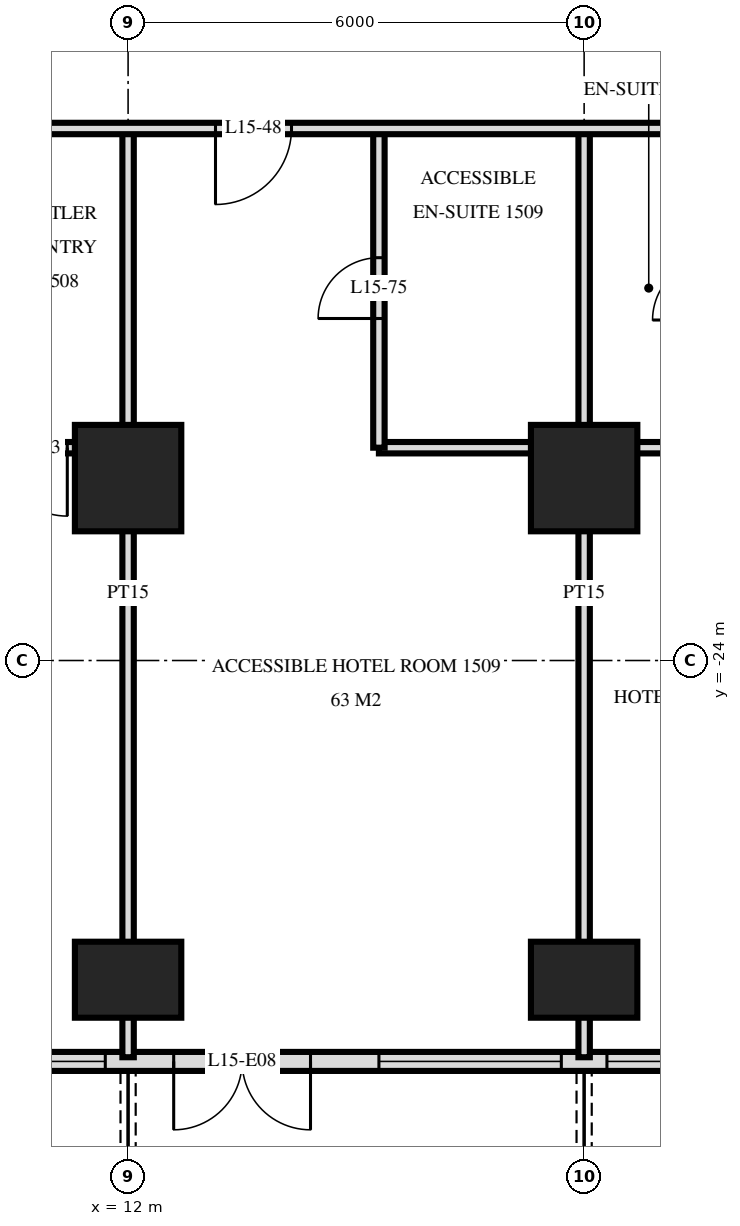
"""IFC4 building model, lengths in metres.
Left out: names, types, materials, properties, quantities, classifications, styles, units other than length and angle.
Written with IfcOpenShell. Run it as: python <this file> out.ifc"""

import sys

from ifc_helpers import new_model, si_unit, direction, frame, frame_2d, origin, origin_2d, place, context, subcontext, project, spatial, rectangle, extrude, element, fill, save


model = new_model("IFC4")
c1 = context("Model", 3, precision=1e-05, world=origin(), true_north=direction((0.0, 1.0)))
c2 = subcontext(c1, "Body", "Model", "MODEL_VIEW")
j1 = project(units=[si_unit("LENGTHUNIT", "METRE"), si_unit("PLANEANGLEUNIT", "RADIAN")], contexts=[c1])
p1 = place(None, origin())
s1 = spatial("IfcSite", under=j1, at=p1, CompositionType="ELEMENT")
p2 = place(p1, origin())
s2 = spatial("IfcBuilding", under=s1, at=p2, CompositionType="ELEMENT")
p3 = place(p2, frame((0.0, 0.0, 63.6)))
s3 = spatial("IfcBuildingStorey", under=s2, at=p3, CompositionType="ELEMENT", Elevation=63.6)
p4 = place(p3, frame((12.0, -28.2, 0.0), z_axis=(0.0, 0.0, 1.0), x_axis=(1.0, 0.0, 0.0)))
e1 = element("IfcColumn", 1, at=p4, inside=s3, PredefinedType="COLUMN", context=c2, shape_type="SweptSolid", body=[
    extrude(rectangle(XDim=1.4, YDim=1.0, at=origin_2d()), origin(), (0.0, 0.0, 1.0), 3.6),
])
p5 = place(p3, frame((12.0, -21.6, 0.0), z_axis=(0.0, 0.0, 1.0), x_axis=(1.0, 0.0, 0.0)))
e2 = element("IfcColumn", 2, at=p5, inside=s3, PredefinedType="COLUMN", context=c2, shape_type="SweptSolid", body=[
    extrude(rectangle(XDim=1.4, YDim=1.4, at=origin_2d()), origin(), (0.0, 0.0, 1.0), 3.6),
])
p6 = place(p3, frame((18.0, -28.2, 0.0), z_axis=(0.0, 0.0, 1.0), x_axis=(1.0, 0.0, 0.0)))
e3 = element("IfcColumn", 3, at=p6, inside=s3, PredefinedType="COLUMN", context=c2, shape_type="SweptSolid", body=[
    extrude(rectangle(XDim=1.4, YDim=1.0, at=origin_2d()), origin(), (0.0, 0.0, 1.0), 3.6),
])
p7 = place(p3, frame((18.0, -21.6, 0.0), z_axis=(0.0, 0.0, 1.0), x_axis=(1.0, 0.0, 0.0)))
e4 = element("IfcColumn", 4, at=p7, inside=s3, PredefinedType="COLUMN", context=c2, shape_type="SweptSolid", body=[
    extrude(rectangle(XDim=1.4, YDim=1.4, at=origin_2d()), origin(), (0.0, 0.0, 1.0), 3.6),
])
p8 = place(p3, frame((-28.775, -29.275, 0.0), z_axis=(0.0, 0.0, 1.0), x_axis=(1.0, 0.0, 0.0)))
e5 = element("IfcWall", 5, at=p8, inside=s3, PredefinedType="SOLIDWALL", context=c2, shape_type="SweptSolid", body=[
    extrude(rectangle(XDim=57.551, YDim=0.25, at=frame_2d((28.775, 0.0))), origin(), (0.0, 0.0, 1.0), 3.32),
])
p9 = place(p8, frame((0.575, 0.0, 0.0)))
e6 = element("IfcOpeningElement", 6, at=p9, cuts=e5, PredefinedType="OPENING", context=c2, shape_type="SweptSolid", body=[
    extrude(rectangle(XDim=1.8, YDim=2.4, at=frame_2d((0.9, 1.2))), frame((0.0, 0.135, 0.0), z_axis=(0.0, -1.0, 0.0), x_axis=(1.0, 0.0, 0.0)), (0.0, 0.0, 1.0), 0.27),
])
p10 = place(p8, frame((5.375, 0.0, 0.0)))
e7 = element("IfcOpeningElement", 7, at=p10, cuts=e5, PredefinedType="OPENING", context=c2, shape_type="SweptSolid", body=[
    extrude(rectangle(XDim=1.8, YDim=2.4, at=frame_2d((0.9, 1.2))), frame((0.0, 0.135, 0.0), z_axis=(0.0, -1.0, 0.0), x_axis=(1.0, 0.0, 0.0)), (0.0, 0.0, 1.0), 0.27),
])
p11 = place(p8, frame((8.075, 0.0, 0.3)))
e8 = element("IfcOpeningElement", 8, at=p11, cuts=e5, PredefinedType="OPENING", context=c2, shape_type="SweptSolid", body=[
    extrude(rectangle(XDim=2.4, YDim=2.1, at=frame_2d((1.2, 1.05))), frame((0.0, 0.135, 0.0), z_axis=(0.0, -1.0, 0.0), x_axis=(1.0, 0.0, 0.0)), (0.0, 0.0, 1.0), 0.27),
])
p12 = place(p8, frame((11.375, 0.0, 0.0)))
e9 = element("IfcOpeningElement", 9, at=p12, cuts=e5, PredefinedType="OPENING", context=c2, shape_type="SweptSolid", body=[
    extrude(rectangle(XDim=1.8, YDim=2.4, at=frame_2d((0.9, 1.2))), frame((0.0, 0.135, 0.0), z_axis=(0.0, -1.0, 0.0), x_axis=(1.0, 0.0, 0.0)), (0.0, 0.0, 1.0), 0.27),
])
p13 = place(p8, frame((14.075, 0.0, 0.3)))
e10 = element("IfcOpeningElement", 10, at=p13, cuts=e5, PredefinedType="OPENING", context=c2, shape_type="SweptSolid", body=[
    extrude(rectangle(XDim=2.4, YDim=2.1, at=frame_2d((1.2, 1.05))), frame((0.0, 0.135, 0.0), z_axis=(0.0, -1.0, 0.0), x_axis=(1.0, 0.0, 0.0)), (0.0, 0.0, 1.0), 0.27),
])
p14 = place(p8, frame((17.375, 0.0, 0.0)))
e11 = element("IfcOpeningElement", 11, at=p14, cuts=e5, PredefinedType="OPENING", context=c2, shape_type="SweptSolid", body=[
    extrude(rectangle(XDim=1.8, YDim=2.4, at=frame_2d((0.9, 1.2))), frame((0.0, 0.135, 0.0), z_axis=(0.0, -1.0, 0.0), x_axis=(1.0, 0.0, 0.0)), (0.0, 0.0, 1.0), 0.27),
])
p15 = place(p8, frame((20.075, 0.0, 0.3)))
e12 = element("IfcOpeningElement", 12, at=p15, cuts=e5, PredefinedType="OPENING", context=c2, shape_type="SweptSolid", body=[
    extrude(rectangle(XDim=2.4, YDim=2.1, at=frame_2d((1.2, 1.05))), frame((0.0, 0.135, 0.0), z_axis=(0.0, -1.0, 0.0), x_axis=(1.0, 0.0, 0.0)), (0.0, 0.0, 1.0), 0.27),
])
p16 = place(p8, frame((23.075, 0.0, 0.3)))
e13 = element("IfcOpeningElement", 13, at=p16, cuts=e5, PredefinedType="OPENING", context=c2, shape_type="SweptSolid", body=[
    extrude(rectangle(XDim=2.4, YDim=2.1, at=frame_2d((1.2, 1.05))), frame((0.0, 0.135, 0.0), z_axis=(0.0, -1.0, 0.0), x_axis=(1.0, 0.0, 0.0)), (0.0, 0.0, 1.0), 0.27),
])
p17 = place(p8, frame((26.375, 0.0, 0.0)))
e14 = element("IfcOpeningElement", 14, at=p17, cuts=e5, PredefinedType="OPENING", context=c2, shape_type="SweptSolid", body=[
    extrude(rectangle(XDim=1.8, YDim=2.4, at=frame_2d((0.9, 1.2))), frame((0.0, 0.135, 0.0), z_axis=(0.0, -1.0, 0.0), x_axis=(1.0, 0.0, 0.0)), (0.0, 0.0, 1.0), 0.27),
])
p18 = place(p8, frame((29.075, 0.0, 0.3)))
e15 = element("IfcOpeningElement", 15, at=p18, cuts=e5, PredefinedType="OPENING", context=c2, shape_type="SweptSolid", body=[
    extrude(rectangle(XDim=2.4, YDim=2.1, at=frame_2d((1.2, 1.05))), frame((0.0, 0.135, 0.0), z_axis=(0.0, -1.0, 0.0), x_axis=(1.0, 0.0, 0.0)), (0.0, 0.0, 1.0), 0.27),
])
p19 = place(p8, frame((32.375, 0.0, 0.0)))
e16 = element("IfcOpeningElement", 16, at=p19, cuts=e5, PredefinedType="OPENING", context=c2, shape_type="SweptSolid", body=[
    extrude(rectangle(XDim=1.8, YDim=2.4, at=frame_2d((0.9, 1.2))), frame((0.0, 0.135, 0.0), z_axis=(0.0, -1.0, 0.0), x_axis=(1.0, 0.0, 0.0)), (0.0, 0.0, 1.0), 0.27),
])
p20 = place(p8, frame((35.375, 0.0, 0.0)))
e17 = element("IfcOpeningElement", 17, at=p20, cuts=e5, PredefinedType="OPENING", context=c2, shape_type="SweptSolid", body=[
    extrude(rectangle(XDim=1.8, YDim=2.4, at=frame_2d((0.9, 1.2))), frame((0.0, 0.135, 0.0), z_axis=(0.0, -1.0, 0.0), x_axis=(1.0, 0.0, 0.0)), (0.0, 0.0, 1.0), 0.27),
])
p21 = place(p8, frame((38.075, 0.0, 0.3)))
e18 = element("IfcOpeningElement", 18, at=p21, cuts=e5, PredefinedType="OPENING", context=c2, shape_type="SweptSolid", body=[
    extrude(rectangle(XDim=2.4, YDim=2.1, at=frame_2d((1.2, 1.05))), frame((0.0, 0.135, 0.0), z_axis=(0.0, -1.0, 0.0), x_axis=(1.0, 0.0, 0.0)), (0.0, 0.0, 1.0), 0.27),
])
p22 = place(p8, frame((41.375, 0.0, 0.0)))
e19 = element("IfcOpeningElement", 19, at=p22, cuts=e5, PredefinedType="OPENING", context=c2, shape_type="SweptSolid", body=[
    extrude(rectangle(XDim=1.8, YDim=2.4, at=frame_2d((0.9, 1.2))), frame((0.0, 0.135, 0.0), z_axis=(0.0, -1.0, 0.0), x_axis=(1.0, 0.0, 0.0)), (0.0, 0.0, 1.0), 0.27),
])
p23 = place(p8, frame((44.075, 0.0, 0.3)))
e20 = element("IfcOpeningElement", 20, at=p23, cuts=e5, PredefinedType="OPENING", context=c2, shape_type="SweptSolid", body=[
    extrude(rectangle(XDim=2.4, YDim=2.1, at=frame_2d((1.2, 1.05))), frame((0.0, 0.135, 0.0), z_axis=(0.0, -1.0, 0.0), x_axis=(1.0, 0.0, 0.0)), (0.0, 0.0, 1.0), 0.27),
])
p24 = place(p8, frame((47.075, 0.0, 0.3)))
e21 = element("IfcOpeningElement", 21, at=p24, cuts=e5, PredefinedType="OPENING", context=c2, shape_type="SweptSolid", body=[
    extrude(rectangle(XDim=2.4, YDim=2.1, at=frame_2d((1.2, 1.05))), frame((0.0, 0.135, 0.0), z_axis=(0.0, -1.0, 0.0), x_axis=(1.0, 0.0, 0.0)), (0.0, 0.0, 1.0), 0.27),
])
p25 = place(p8, frame((50.375, 0.0, 0.0)))
e22 = element("IfcOpeningElement", 22, at=p25, cuts=e5, PredefinedType="OPENING", context=c2, shape_type="SweptSolid", body=[
    extrude(rectangle(XDim=1.8, YDim=2.4, at=frame_2d((0.9, 1.2))), frame((0.0, 0.135, 0.0), z_axis=(0.0, -1.0, 0.0), x_axis=(1.0, 0.0, 0.0)), (0.0, 0.0, 1.0), 0.27),
])
p26 = place(p8, frame((53.375, 0.0, 0.0)))
e23 = element("IfcOpeningElement", 23, at=p26, cuts=e5, PredefinedType="OPENING", context=c2, shape_type="SweptSolid", body=[
    extrude(rectangle(XDim=1.8, YDim=2.4, at=frame_2d((0.9, 1.2))), frame((0.0, 0.135, 0.0), z_axis=(0.0, -1.0, 0.0), x_axis=(1.0, 0.0, 0.0)), (0.0, 0.0, 1.0), 0.27),
])
p27 = place(p3, frame((18.0, -29.22, 0.0), z_axis=(0.0, 0.0, 1.0), x_axis=(0.0, 1.0, 0.0)))
e24 = element("IfcWall", 24, at=p27, inside=s3, PredefinedType="PARTITIONING", context=c2, shape_type="SweptSolid", body=[
    extrude(rectangle(XDim=12.22, YDim=0.15, at=frame_2d((6.11, 0.0))), origin(), (0.0, 0.0, 1.0), 3.32),
])
p28 = place(p3, frame((15.3, -21.2, 0.0), z_axis=(0.0, 0.0, 1.0), x_axis=(0.0, 1.0, 0.0)))
e25 = element("IfcWall", 25, at=p28, inside=s3, PredefinedType="PARTITIONING", context=c2, shape_type="SweptSolid", body=[
    extrude(rectangle(XDim=4.2, YDim=0.15, at=frame_2d((2.1, 0.0))), origin(), (0.0, 0.0, 1.0), 3.32),
])
p29 = place(p28, frame((1.7, 0.0, 0.0)))
e26 = element("IfcOpeningElement", 26, at=p29, cuts=e25, PredefinedType="OPENING", context=c2, shape_type="SweptSolid", body=[
    extrude(rectangle(XDim=0.8, YDim=2.1, at=frame_2d((0.4, 1.05))), frame((0.0, 0.085, 0.0), z_axis=(0.0, -1.0, 0.0), x_axis=(1.0, 0.0, 0.0)), (0.0, 0.0, 1.0), 0.17),
])
p30 = place(p3, frame((12.0, -29.22, 0.0), z_axis=(0.0, 0.0, 1.0), x_axis=(0.0, 1.0, 0.0)))
e27 = element("IfcWall", 27, at=p30, inside=s3, PredefinedType="PARTITIONING", context=c2, shape_type="SweptSolid", body=[
    extrude(rectangle(XDim=12.22, YDim=0.15, at=frame_2d((6.11, 0.0))), origin(), (0.0, 0.0, 1.0), 3.32),
])
p31 = place(p3, frame((4.2, -21.2, 0.0), z_axis=(0.0, 0.0, 1.0), x_axis=(1.0, 0.0, 0.0)))
e28 = element("IfcWall", 28, at=p31, inside=s3, PredefinedType="PARTITIONING", context=c2, shape_type="SweptSolid", body=[
    extrude(rectangle(XDim=7.8, YDim=0.15, at=frame_2d((3.9, 0.0))), origin(), (0.0, 0.0, 1.0), 3.32),
])
p32 = place(p31, frame((0.2, 0.0, 0.0)))
e29 = element("IfcOpeningElement", 29, at=p32, cuts=e28, PredefinedType="OPENING", context=c2, shape_type="SweptSolid", body=[
    extrude(rectangle(XDim=0.8, YDim=2.1, at=frame_2d((0.4, 1.05))), frame((0.0, 0.085, 0.0), z_axis=(0.0, -1.0, 0.0), x_axis=(1.0, 0.0, 0.0)), (0.0, 0.0, 1.0), 0.17),
])
p33 = place(p31, frame((4.03, 0.0, 0.0)))
e30 = element("IfcOpeningElement", 30, at=p33, cuts=e28, PredefinedType="OPENING", context=c2, shape_type="SweptSolid", body=[
    extrude(rectangle(XDim=0.9, YDim=2.1, at=frame_2d((0.45, 1.05))), frame((0.0, 0.085, 0.0), z_axis=(0.0, -1.0, 0.0), x_axis=(1.0, 0.0, 0.0)), (0.0, 0.0, 1.0), 0.17),
])
p34 = place(p31, frame((6.1, 0.0, 0.0)))
e31 = element("IfcOpeningElement", 31, at=p34, cuts=e28, PredefinedType="OPENING", context=c2, shape_type="SweptSolid", body=[
    extrude(rectangle(XDim=0.9, YDim=2.1, at=frame_2d((0.45, 1.05))), frame((0.0, 0.085, 0.0), z_axis=(0.0, -1.0, 0.0), x_axis=(1.0, 0.0, 0.0)), (0.0, 0.0, 1.0), 0.17),
])
p35 = place(p3, frame((15.3, -21.2, 0.0), z_axis=(0.0, 0.0, 1.0), x_axis=(1.0, 0.0, 0.0)))
e32 = element("IfcWall", 32, at=p35, inside=s3, PredefinedType="PARTITIONING", context=c2, shape_type="SweptSolid", body=[
    extrude(rectangle(XDim=4.4, YDim=0.15, at=frame_2d((2.2, 0.0))), origin(), (0.0, 0.0, 1.0), 3.32),
])
p36 = place(p3, frame((-33.12, -17.0, 0.0), z_axis=(0.0, 0.0, 1.0), x_axis=(1.0, 0.0, 0.0)))
e33 = element("IfcWall", 33, at=p36, inside=s3, PredefinedType="PARTITIONING", context=c2, shape_type="SweptSolid", body=[
    extrude(rectangle(XDim=66.24, YDim=0.15, at=frame_2d((33.12, 0.0))), origin(), (0.0, 0.0, 1.0), 3.32),
])
p37 = place(p36, frame((12.27, 0.0, 0.0)))
e34 = element("IfcOpeningElement", 34, at=p37, cuts=e33, PredefinedType="OPENING", context=c2, shape_type="SweptSolid", body=[
    extrude(rectangle(XDim=1.0, YDim=2.1, at=frame_2d((0.5, 1.05))), frame((0.0, 0.085, 0.0), z_axis=(0.0, -1.0, 0.0), x_axis=(1.0, 0.0, 0.0)), (0.0, 0.0, 1.0), 0.17),
])
p38 = place(p36, frame((16.97, 0.0, 0.0)))
e35 = element("IfcOpeningElement", 35, at=p38, cuts=e33, PredefinedType="OPENING", context=c2, shape_type="SweptSolid", body=[
    extrude(rectangle(XDim=1.0, YDim=2.1, at=frame_2d((0.5, 1.05))), frame((0.0, 0.085, 0.0), z_axis=(0.0, -1.0, 0.0), x_axis=(1.0, 0.0, 0.0)), (0.0, 0.0, 1.0), 0.17),
])
p39 = place(p36, frame((18.27, 0.0, 0.0)))
e36 = element("IfcOpeningElement", 36, at=p39, cuts=e33, PredefinedType="OPENING", context=c2, shape_type="SweptSolid", body=[
    extrude(rectangle(XDim=1.0, YDim=2.1, at=frame_2d((0.5, 1.05))), frame((0.0, 0.085, 0.0), z_axis=(0.0, -1.0, 0.0), x_axis=(1.0, 0.0, 0.0)), (0.0, 0.0, 1.0), 0.17),
])
p40 = place(p36, frame((22.97, 0.0, 0.0)))
e37 = element("IfcOpeningElement", 37, at=p40, cuts=e33, PredefinedType="OPENING", context=c2, shape_type="SweptSolid", body=[
    extrude(rectangle(XDim=1.0, YDim=2.1, at=frame_2d((0.5, 1.05))), frame((0.0, 0.085, 0.0), z_axis=(0.0, -1.0, 0.0), x_axis=(1.0, 0.0, 0.0)), (0.0, 0.0, 1.0), 0.17),
])
p41 = place(p36, frame((24.27, 0.0, 0.0)))
e38 = element("IfcOpeningElement", 38, at=p41, cuts=e33, PredefinedType="OPENING", context=c2, shape_type="SweptSolid", body=[
    extrude(rectangle(XDim=1.0, YDim=2.1, at=frame_2d((0.5, 1.05))), frame((0.0, 0.085, 0.0), z_axis=(0.0, -1.0, 0.0), x_axis=(1.0, 0.0, 0.0)), (0.0, 0.0, 1.0), 0.17),
])
p42 = place(p36, frame((28.97, 0.0, 0.0)))
e39 = element("IfcOpeningElement", 39, at=p42, cuts=e33, PredefinedType="OPENING", context=c2, shape_type="SweptSolid", body=[
    extrude(rectangle(XDim=1.0, YDim=2.1, at=frame_2d((0.5, 1.05))), frame((0.0, 0.085, 0.0), z_axis=(0.0, -1.0, 0.0), x_axis=(1.0, 0.0, 0.0)), (0.0, 0.0, 1.0), 0.17),
])
p43 = place(p36, frame((30.27, 0.0, 0.0)))
e40 = element("IfcOpeningElement", 40, at=p43, cuts=e33, PredefinedType="OPENING", context=c2, shape_type="SweptSolid", body=[
    extrude(rectangle(XDim=1.0, YDim=2.1, at=frame_2d((0.5, 1.05))), frame((0.0, 0.085, 0.0), z_axis=(0.0, -1.0, 0.0), x_axis=(1.0, 0.0, 0.0)), (0.0, 0.0, 1.0), 0.17),
])
p44 = place(p36, frame((33.82, 0.0, 0.0)))
e41 = element("IfcOpeningElement", 41, at=p44, cuts=e33, PredefinedType="OPENING", context=c2, shape_type="SweptSolid", body=[
    extrude(rectangle(XDim=1.0, YDim=2.1, at=frame_2d((0.5, 1.05))), frame((0.0, 0.085, 0.0), z_axis=(0.0, -1.0, 0.0), x_axis=(1.0, 0.0, 0.0)), (0.0, 0.0, 1.0), 0.17),
])
p45 = place(p36, frame((46.27, 0.0, 0.0)))
e42 = element("IfcOpeningElement", 42, at=p45, cuts=e33, PredefinedType="OPENING", context=c2, shape_type="SweptSolid", body=[
    extrude(rectangle(XDim=1.0, YDim=2.1, at=frame_2d((0.5, 1.05))), frame((0.0, 0.085, 0.0), z_axis=(0.0, -1.0, 0.0), x_axis=(1.0, 0.0, 0.0)), (0.0, 0.0, 1.0), 0.17),
])
p46 = place(p36, frame((52.97, 0.0, 0.0)))
e43 = element("IfcOpeningElement", 43, at=p46, cuts=e33, PredefinedType="OPENING", context=c2, shape_type="SweptSolid", body=[
    extrude(rectangle(XDim=1.0, YDim=2.1, at=frame_2d((0.5, 1.05))), frame((0.0, 0.085, 0.0), z_axis=(0.0, -1.0, 0.0), x_axis=(1.0, 0.0, 0.0)), (0.0, 0.0, 1.0), 0.17),
])
p47 = place(p36, frame((6.05, 0.0, 0.0)))
e44 = element("IfcOpeningElement", 44, at=p47, cuts=e33, PredefinedType="OPENING", context=c2, shape_type="SweptSolid", body=[
    extrude(rectangle(XDim=1.0, YDim=2.1, at=frame_2d((0.5, 1.05))), frame((0.0, 0.085, 0.0), z_axis=(0.0, -1.0, 0.0), x_axis=(1.0, 0.0, 0.0)), (0.0, 0.0, 1.0), 0.17),
])
p48 = place(p36, frame((59.15, 0.0, 0.0)))
e45 = element("IfcOpeningElement", 45, at=p48, cuts=e33, PredefinedType="OPENING", context=c2, shape_type="SweptSolid", body=[
    extrude(rectangle(XDim=1.0, YDim=2.1, at=frame_2d((0.5, 1.05))), frame((0.0, 0.085, 0.0), z_axis=(0.0, -1.0, 0.0), x_axis=(1.0, 0.0, 0.0)), (0.0, 0.0, 1.0), 0.17),
])
p49 = place(p21, origin())
e46 = element("IfcWindow", 46, at=p49, inside=s3, PartitioningType="SINGLE_PANEL", PredefinedType="WINDOW", context=c2, shape_type="SweptSolid", body=[
    extrude(rectangle(XDim=2.4, YDim=2.1, at=frame_2d((1.2, 1.05))), frame((0.0, 0.03, 0.0), z_axis=(0.0, -1.0, 0.0), x_axis=(1.0, 0.0, 0.0)), (0.0, 0.0, 1.0), 0.06),
])
fill(e18, e46)
p50 = place(p22, frame((0.9, 0.0, 0.0), z_axis=(0.0, 0.0, 1.0), x_axis=(-1.0, 0.0, 0.0)))
e47 = element("IfcDoor", 47, at=p50, inside=s3, OperationType="DOUBLE_DOOR_SINGLE_SWING", PredefinedType="DOOR", context=c2, shape_type="SweptSolid", body=[
    extrude(rectangle(XDim=1.8, YDim=2.4, at=frame_2d((0.0, 1.2))), frame((0.0, -0.025, 0.0), z_axis=(0.0, 1.0, 0.0), x_axis=(-1.0, 0.0, 0.0)), (0.0, 0.0, 1.0), 0.05),
])
fill(e19, e47)
p51 = place(p23, origin())
e48 = element("IfcWindow", 48, at=p51, inside=s3, PartitioningType="SINGLE_PANEL", PredefinedType="WINDOW", context=c2, shape_type="SweptSolid", body=[
    extrude(rectangle(XDim=2.4, YDim=2.1, at=frame_2d((1.2, 1.05))), frame((0.0, 0.03, 0.0), z_axis=(0.0, -1.0, 0.0), x_axis=(1.0, 0.0, 0.0)), (0.0, 0.0, 1.0), 0.06),
])
fill(e20, e48)
p52 = place(p24, origin())
e49 = element("IfcWindow", 49, at=p52, inside=s3, PartitioningType="SINGLE_PANEL", PredefinedType="WINDOW", context=c2, shape_type="SweptSolid", body=[
    extrude(rectangle(XDim=2.4, YDim=2.1, at=frame_2d((1.2, 1.05))), frame((0.0, 0.03, 0.0), z_axis=(0.0, -1.0, 0.0), x_axis=(1.0, 0.0, 0.0)), (0.0, 0.0, 1.0), 0.06),
])
fill(e21, e49)
p53 = place(p45, frame((0.5, 0.0, 0.0), z_axis=(0.0, 0.0, 1.0), x_axis=(-1.0, 0.0, 0.0)))
e50 = element("IfcDoor", 50, at=p53, inside=s3, OperationType="SINGLE_SWING_LEFT", PredefinedType="DOOR", context=c2, shape_type="SweptSolid", body=[
    extrude(rectangle(XDim=1.0, YDim=2.1, at=frame_2d((0.0, 1.05))), frame((0.0, -0.025, 0.0), z_axis=(0.0, 1.0, 0.0), x_axis=(-1.0, 0.0, 0.0)), (0.0, 0.0, 1.0), 0.05),
])
fill(e42, e50)
p54 = place(p34, frame((0.45, 0.0, 0.0), z_axis=(0.0, 0.0, 1.0), x_axis=(-1.0, 0.0, 0.0)))
e51 = element("IfcDoor", 51, at=p54, inside=s3, OperationType="SINGLE_SWING_RIGHT", PredefinedType="DOOR", context=c2, shape_type="SweptSolid", body=[
    extrude(rectangle(XDim=0.9, YDim=2.1, at=frame_2d((0.0, 1.05))), frame((0.0, -0.025, 0.0), z_axis=(0.0, 1.0, 0.0), x_axis=(-1.0, 0.0, 0.0)), (0.0, 0.0, 1.0), 0.05),
])
fill(e31, e51)
p55 = place(p29, origin())
e52 = element("IfcDoor", 52, at=p55, inside=s3, OperationType="SINGLE_SWING_RIGHT", PredefinedType="DOOR", context=c2, shape_type="SweptSolid", body=[
    extrude(rectangle(XDim=0.8, YDim=2.1, at=frame_2d((0.4, 1.05))), frame((0.0, 0.025, 0.0), z_axis=(0.0, -1.0, 0.0), x_axis=(1.0, 0.0, 0.0)), (0.0, 0.0, 1.0), 0.05),
])
fill(e26, e52)
save(model, sys.argv[1])
